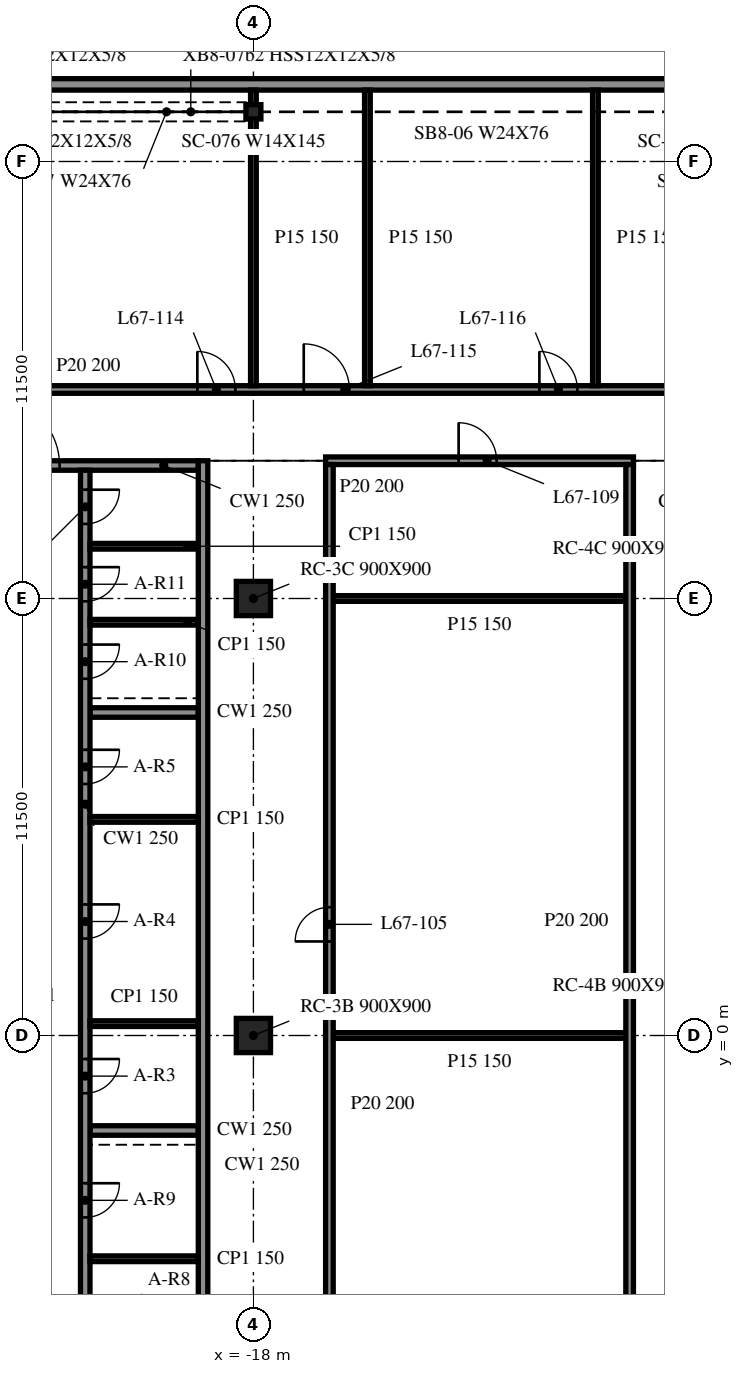
"""IFC4 building model, lengths in metres.
Left out: names, types, materials, properties, quantities, classifications, styles, units other than length and angle.
Written with IfcOpenShell. Run it as: python <this file> out.ifc"""

import sys

from ifc_helpers import new_model, si_unit, direction, frame, frame_2d, origin, origin_2d, place, context, subcontext, project, spatial, rectangle, i_section, extrude, element, fill, save


model = new_model("IFC4")
c1 = context("Model", 3, precision=1e-05, world=origin(), true_north=direction((0.0, 1.0)))
c2 = subcontext(c1, "Body", "Model", "MODEL_VIEW")
j1 = project(units=[si_unit("LENGTHUNIT", "METRE"), si_unit("PLANEANGLEUNIT", "RADIAN")], contexts=[c1])
p1 = place(None, origin())
s1 = spatial("IfcSite", under=j1, at=p1, CompositionType="ELEMENT")
p2 = place(p1, origin())
s2 = spatial("IfcBuilding", under=s1, at=p2, CompositionType="ELEMENT")
p3 = place(p2, frame((0.0, 0.0, 274.7)))
s3 = spatial("IfcBuildingStorey", under=s2, at=p3, CompositionType="ELEMENT", Elevation=274.7)
for number, where, z_axis, x_axis in (
    (1, (-18.0, 0.0, -0.34), (0.0, 0.0, 1.0), (1.0, 0.0, 0.0)),
    (2, (-18.0, 11.5, -0.34), (0.0, 0.0, 1.0), (1.0, 0.0, 0.0)),
):
    element("IfcColumn", number, at=place(p3, frame(where, z_axis=z_axis, x_axis=x_axis)), inside=s3, PredefinedType="COLUMN", context=c2, shape_type="SweptSolid", body=[
        extrude(rectangle(XDim=0.9, YDim=0.9, at=origin_2d()), origin(), (0.0, 0.0, 1.0), 3.8),
    ])
p4 = place(p3, frame((-18.0, 24.307, -0.34), z_axis=(0.0, 0.0, 1.0), x_axis=(1.0, 0.0, 0.0)))
e3 = element("IfcColumn", 3, at=p4, inside=s3, PredefinedType="COLUMN", context=c2, shape_type="SweptSolid", body=[
    extrude(i_section(OverallWidth=0.394, OverallDepth=0.376, WebThickness=0.017, FlangeThickness=0.028, at=origin_2d()), origin(), (0.0, 0.0, 1.0), 3.8),
])
p5 = place(p3, frame((42.0, 25.029, 0.0), z_axis=(0.0, 0.0, 1.0), x_axis=(-1.0, 0.0, 0.0)))
e4 = element("IfcWall", 4, at=p5, inside=s3, PredefinedType="NOTDEFINED", context=c2, shape_type="SweptSolid", body=[
    extrude(rectangle(XDim=84.0, YDim=0.3, at=frame_2d((42.0, 0.0))), origin(), (0.0, 0.0, 1.0), 2.853),
])
p6 = place(p3, frame((-19.325, -9.125, 0.0), z_axis=(0.0, 0.0, 1.0), x_axis=(0.0, 1.0, 0.0)))
e5 = element("IfcWall", 5, at=p6, inside=s3, PredefinedType="SOLIDWALL", context=c2, shape_type="SweptSolid", body=[
    extrude(rectangle(XDim=24.25, YDim=0.25, at=frame_2d((12.125, 0.0))), origin(), (0.0, 0.0, 1.0), 3.46),
])
p7 = place(p3, frame((-28.55, 15.0, 0.0), z_axis=(0.0, 0.0, 1.0), x_axis=(1.0, 0.0, 0.0)))
e6 = element("IfcWall", 6, at=p7, inside=s3, PredefinedType="SOLIDWALL", context=c2, shape_type="SweptSolid", body=[
    extrude(rectangle(XDim=9.1, YDim=0.25, at=frame_2d((4.55, 0.0))), origin(), (0.0, 0.0, 1.0), 3.46),
])
p8 = place(p7, frame((3.65, 0.0, 0.0)))
e7 = element("IfcOpeningElement", 7, at=p8, cuts=e6, PredefinedType="OPENING", context=c2, shape_type="SweptSolid", body=[
    extrude(rectangle(XDim=1.8, YDim=2.1, at=frame_2d((0.9, 1.05))), frame((0.0, 0.135, 0.0), z_axis=(0.0, -1.0, 0.0), x_axis=(1.0, 0.0, 0.0)), (0.0, 0.0, 1.0), 0.27),
])
p9 = place(p3, frame((-22.425, 14.875, 0.0), z_axis=(0.0, 0.0, 1.0), x_axis=(0.0, -1.0, 0.0)))
e8 = element("IfcWall", 8, at=p9, inside=s3, PredefinedType="SOLIDWALL", context=c2, shape_type="SweptSolid", body=[
    extrude(rectangle(XDim=23.75, YDim=0.25, at=frame_2d((11.875, 0.0))), origin(), (0.0, 0.0, 1.0), 3.46),
])
p10 = place(p9, frame((15.494, 0.0, 0.0)))
e9 = element("IfcOpeningElement", 9, at=p10, cuts=e8, PredefinedType="OPENING", context=c2, shape_type="SweptSolid", body=[
    extrude(rectangle(XDim=0.9, YDim=2.1, at=frame_2d((0.45, 1.05))), frame((0.0, 0.135, 0.0), z_axis=(0.0, -1.0, 0.0), x_axis=(1.0, 0.0, 0.0)), (0.0, 0.0, 1.0), 0.27),
])
p11 = place(p9, frame((11.425, 0.0, 0.0)))
e10 = element("IfcOpeningElement", 10, at=p11, cuts=e8, PredefinedType="OPENING", context=c2, shape_type="SweptSolid", body=[
    extrude(rectangle(XDim=0.9, YDim=2.1, at=frame_2d((0.45, 1.05))), frame((0.0, 0.135, 0.0), z_axis=(0.0, -1.0, 0.0), x_axis=(1.0, 0.0, 0.0)), (0.0, 0.0, 1.0), 0.27),
])
p12 = place(p9, frame((7.356, 0.0, 0.0)))
e11 = element("IfcOpeningElement", 11, at=p12, cuts=e8, PredefinedType="OPENING", context=c2, shape_type="SweptSolid", body=[
    extrude(rectangle(XDim=0.9, YDim=2.1, at=frame_2d((0.45, 1.05))), frame((0.0, 0.135, 0.0), z_axis=(0.0, -1.0, 0.0), x_axis=(1.0, 0.0, 0.0)), (0.0, 0.0, 1.0), 0.27),
])
p13 = place(p9, frame((21.837, 0.0, 0.0)))
e12 = element("IfcOpeningElement", 12, at=p13, cuts=e8, PredefinedType="OPENING", context=c2, shape_type="SweptSolid", body=[
    extrude(rectangle(XDim=0.9, YDim=2.1, at=frame_2d((0.45, 1.05))), frame((0.0, 0.135, 0.0), z_axis=(0.0, -1.0, 0.0), x_axis=(1.0, 0.0, 0.0)), (0.0, 0.0, 1.0), 0.27),
])
p14 = place(p9, frame((18.762, 0.0, 0.0)))
e13 = element("IfcOpeningElement", 13, at=p14, cuts=e8, PredefinedType="OPENING", context=c2, shape_type="SweptSolid", body=[
    extrude(rectangle(XDim=0.9, YDim=2.1, at=frame_2d((0.45, 1.05))), frame((0.0, 0.135, 0.0), z_axis=(0.0, -1.0, 0.0), x_axis=(1.0, 0.0, 0.0)), (0.0, 0.0, 1.0), 0.27),
])
p15 = place(p9, frame((4.587, 0.0, 0.0)))
e14 = element("IfcOpeningElement", 14, at=p15, cuts=e8, PredefinedType="OPENING", context=c2, shape_type="SweptSolid", body=[
    extrude(rectangle(XDim=0.9, YDim=2.1, at=frame_2d((0.45, 1.05))), frame((0.0, 0.135, 0.0), z_axis=(0.0, -1.0, 0.0), x_axis=(1.0, 0.0, 0.0)), (0.0, 0.0, 1.0), 0.27),
])
p16 = place(p9, frame((2.55, 0.0, 0.0)))
e15 = element("IfcOpeningElement", 15, at=p16, cuts=e8, PredefinedType="OPENING", context=c2, shape_type="SweptSolid", body=[
    extrude(rectangle(XDim=0.9, YDim=2.1, at=frame_2d((0.45, 1.05))), frame((0.0, 0.135, 0.0), z_axis=(0.0, -1.0, 0.0), x_axis=(1.0, 0.0, 0.0)), (0.0, 0.0, 1.0), 0.27),
])
p17 = place(p9, frame((0.512, 0.0, 0.0)))
e16 = element("IfcOpeningElement", 16, at=p17, cuts=e8, PredefinedType="OPENING", context=c2, shape_type="SweptSolid", body=[
    extrude(rectangle(XDim=0.9, YDim=2.1, at=frame_2d((0.45, 1.05))), frame((0.0, 0.135, 0.0), z_axis=(0.0, -1.0, 0.0), x_axis=(1.0, 0.0, 0.0)), (0.0, 0.0, 1.0), 0.27),
])
for number, where, z_axis, x_axis in (
    (17, (-22.3, -2.5, 0.0), (0.0, 0.0, 1.0), (1.0, 0.0, 0.0)),
    (18, (-22.3, 8.5, 0.0), (0.0, 0.0, 1.0), (1.0, 0.0, 0.0)),
):
    element("IfcWall", number, at=place(p3, frame(where, z_axis=z_axis, x_axis=x_axis)), inside=s3, PredefinedType="SOLIDWALL", context=c2, shape_type="SweptSolid", body=[
        extrude(rectangle(XDim=2.85, YDim=0.25, at=frame_2d((1.425, 0.0))), origin(), (0.0, 0.0, 1.0), 3.46),
    ])
for number, where, z_axis, x_axis in (
    (19, (-22.3, 0.312, 0.0), (0.0, 0.0, 1.0), (1.0, 0.0, 0.0)),
    (20, (-22.3, 5.688, 0.0), (0.0, 0.0, 1.0), (1.0, 0.0, 0.0)),
    (21, (-22.3, -5.875, 0.0), (0.0, 0.0, 1.0), (1.0, 0.0, 0.0)),
    (22, (-22.3, 10.875, 0.0), (0.0, 0.0, 1.0), (1.0, 0.0, 0.0)),
    (23, (-22.3, 12.875, 0.0), (0.0, 0.0, 1.0), (1.0, 0.0, 0.0)),
):
    element("IfcWall", number, at=place(p3, frame(where, z_axis=z_axis, x_axis=x_axis)), inside=s3, PredefinedType="PARTITIONING", context=c2, shape_type="SweptSolid", body=[
        extrude(rectangle(XDim=2.85, YDim=0.15, at=frame_2d((1.425, 0.0))), origin(), (0.0, 0.0, 1.0), 3.46),
    ])
for number, where, z_axis, x_axis in (
    (24, (-15.9, 0.0, 0.0), (0.0, 0.0, 1.0), (1.0, 0.0, 0.0)),
    (25, (-15.9, 11.5, 0.0), (0.0, 0.0, 1.0), (1.0, 0.0, 0.0)),
):
    element("IfcWall", number, at=place(p3, frame(where, z_axis=z_axis, x_axis=x_axis)), inside=s3, PredefinedType="PARTITIONING", context=c2, shape_type="SweptSolid", body=[
        extrude(rectangle(XDim=7.7, YDim=0.15, at=frame_2d((3.85, 0.0))), origin(), (0.0, 0.0, 1.0), 3.46),
    ])
p18 = place(p3, frame((-16.1, 15.125, 0.0), z_axis=(0.0, 0.0, 1.0), x_axis=(1.0, 0.0, 0.0)))
e26 = element("IfcWall", 26, at=p18, inside=s3, PredefinedType="PARTITIONING", context=c2, shape_type="SweptSolid", body=[
    extrude(rectangle(XDim=8.1, YDim=0.2, at=frame_2d((4.05, 0.0))), origin(), (0.0, 0.0, 1.0), 3.46),
])
p19 = place(p18, frame((3.5, 0.0, 0.0)))
e27 = element("IfcOpeningElement", 27, at=p19, cuts=e26, PredefinedType="OPENING", context=c2, shape_type="SweptSolid", body=[
    extrude(rectangle(XDim=1.0, YDim=2.1, at=frame_2d((0.5, 1.05))), frame((0.0, 0.11, 0.0), z_axis=(0.0, -1.0, 0.0), x_axis=(1.0, 0.0, 0.0)), (0.0, 0.0, 1.0), 0.22),
])
p20 = place(p3, frame((-47.975, 17.0, 0.0), z_axis=(0.0, 0.0, 1.0), x_axis=(1.0, 0.0, 0.0)))
e28 = element("IfcWall", 28, at=p20, inside=s3, PredefinedType="PARTITIONING", context=c2, shape_type="SweptSolid", body=[
    extrude(rectangle(XDim=95.95, YDim=0.2, at=frame_2d((47.975, 0.0))), origin(), (0.0, 0.0, 1.0), 3.46),
])
p21 = place(p20, frame((7.3, 0.0, 0.0)))
e29 = element("IfcOpeningElement", 29, at=p21, cuts=e28, PredefinedType="OPENING", context=c2, shape_type="SweptSolid", body=[
    extrude(rectangle(XDim=1.2, YDim=2.1, at=frame_2d((0.6, 1.05))), frame((0.0, 0.11, 0.0), z_axis=(0.0, -1.0, 0.0), x_axis=(1.0, 0.0, 0.0)), (0.0, 0.0, 1.0), 0.22),
])
p22 = place(p20, frame((13.3, 0.0, 0.0)))
e30 = element("IfcOpeningElement", 30, at=p22, cuts=e28, PredefinedType="OPENING", context=c2, shape_type="SweptSolid", body=[
    extrude(rectangle(XDim=1.2, YDim=2.1, at=frame_2d((0.6, 1.05))), frame((0.0, 0.11, 0.0), z_axis=(0.0, -1.0, 0.0), x_axis=(1.0, 0.0, 0.0)), (0.0, 0.0, 1.0), 0.22),
])
p23 = place(p20, frame((19.3, 0.0, 0.0)))
e31 = element("IfcOpeningElement", 31, at=p23, cuts=e28, PredefinedType="OPENING", context=c2, shape_type="SweptSolid", body=[
    extrude(rectangle(XDim=1.2, YDim=2.1, at=frame_2d((0.6, 1.05))), frame((0.0, 0.11, 0.0), z_axis=(0.0, -1.0, 0.0), x_axis=(1.0, 0.0, 0.0)), (0.0, 0.0, 1.0), 0.22),
])
p24 = place(p20, frame((28.5, 0.0, 0.0)))
e32 = element("IfcOpeningElement", 32, at=p24, cuts=e28, PredefinedType="OPENING", context=c2, shape_type="SweptSolid", body=[
    extrude(rectangle(XDim=1.0, YDim=2.1, at=frame_2d((0.5, 1.05))), frame((0.0, 0.11, 0.0), z_axis=(0.0, -1.0, 0.0), x_axis=(1.0, 0.0, 0.0)), (0.0, 0.0, 1.0), 0.22),
])
p25 = place(p20, frame((31.3, 0.0, 0.0)))
e33 = element("IfcOpeningElement", 33, at=p25, cuts=e28, PredefinedType="OPENING", context=c2, shape_type="SweptSolid", body=[
    extrude(rectangle(XDim=1.2, YDim=2.1, at=frame_2d((0.6, 1.05))), frame((0.0, 0.11, 0.0), z_axis=(0.0, -1.0, 0.0), x_axis=(1.0, 0.0, 0.0)), (0.0, 0.0, 1.0), 0.22),
])
p26 = place(p20, frame((37.5, 0.0, 0.0)))
e34 = element("IfcOpeningElement", 34, at=p26, cuts=e28, PredefinedType="OPENING", context=c2, shape_type="SweptSolid", body=[
    extrude(rectangle(XDim=1.0, YDim=2.1, at=frame_2d((0.5, 1.05))), frame((0.0, 0.11, 0.0), z_axis=(0.0, -1.0, 0.0), x_axis=(1.0, 0.0, 0.0)), (0.0, 0.0, 1.0), 0.22),
])
p27 = place(p20, frame((43.3, 0.0, 0.0)))
e35 = element("IfcOpeningElement", 35, at=p27, cuts=e28, PredefinedType="OPENING", context=c2, shape_type="SweptSolid", body=[
    extrude(rectangle(XDim=1.2, YDim=2.1, at=frame_2d((0.6, 1.05))), frame((0.0, 0.11, 0.0), z_axis=(0.0, -1.0, 0.0), x_axis=(1.0, 0.0, 0.0)), (0.0, 0.0, 1.0), 0.22),
])
p28 = place(p20, frame((47.3, 0.0, 0.0)))
e36 = element("IfcOpeningElement", 36, at=p28, cuts=e28, PredefinedType="OPENING", context=c2, shape_type="SweptSolid", body=[
    extrude(rectangle(XDim=1.2, YDim=2.1, at=frame_2d((0.6, 1.05))), frame((0.0, 0.11, 0.0), z_axis=(0.0, -1.0, 0.0), x_axis=(1.0, 0.0, 0.0)), (0.0, 0.0, 1.0), 0.22),
])
p29 = place(p20, frame((51.1, 0.0, 0.0)))
e37 = element("IfcOpeningElement", 37, at=p29, cuts=e28, PredefinedType="OPENING", context=c2, shape_type="SweptSolid", body=[
    extrude(rectangle(XDim=1.2, YDim=2.1, at=frame_2d((0.6, 1.05))), frame((0.0, 0.11, 0.0), z_axis=(0.0, -1.0, 0.0), x_axis=(1.0, 0.0, 0.0)), (0.0, 0.0, 1.0), 0.22),
])
p30 = place(p20, frame((60.1, 0.0, 0.0)))
e38 = element("IfcOpeningElement", 38, at=p30, cuts=e28, PredefinedType="OPENING", context=c2, shape_type="SweptSolid", body=[
    extrude(rectangle(XDim=1.0, YDim=2.1, at=frame_2d((0.5, 1.05))), frame((0.0, 0.11, 0.0), z_axis=(0.0, -1.0, 0.0), x_axis=(1.0, 0.0, 0.0)), (0.0, 0.0, 1.0), 0.22),
])
p31 = place(p20, frame((63.1, 0.0, 0.0)))
e39 = element("IfcOpeningElement", 39, at=p31, cuts=e28, PredefinedType="OPENING", context=c2, shape_type="SweptSolid", body=[
    extrude(rectangle(XDim=1.2, YDim=2.1, at=frame_2d((0.6, 1.05))), frame((0.0, 0.11, 0.0), z_axis=(0.0, -1.0, 0.0), x_axis=(1.0, 0.0, 0.0)), (0.0, 0.0, 1.0), 0.22),
])
p32 = place(p20, frame((69.1, 0.0, 0.0)))
e40 = element("IfcOpeningElement", 40, at=p32, cuts=e28, PredefinedType="OPENING", context=c2, shape_type="SweptSolid", body=[
    extrude(rectangle(XDim=1.0, YDim=2.1, at=frame_2d((0.5, 1.05))), frame((0.0, 0.11, 0.0), z_axis=(0.0, -1.0, 0.0), x_axis=(1.0, 0.0, 0.0)), (0.0, 0.0, 1.0), 0.22),
])
p33 = place(p20, frame((75.1, 0.0, 0.0)))
e41 = element("IfcOpeningElement", 41, at=p33, cuts=e28, PredefinedType="OPENING", context=c2, shape_type="SweptSolid", body=[
    extrude(rectangle(XDim=1.2, YDim=2.1, at=frame_2d((0.6, 1.05))), frame((0.0, 0.11, 0.0), z_axis=(0.0, -1.0, 0.0), x_axis=(1.0, 0.0, 0.0)), (0.0, 0.0, 1.0), 0.22),
])
p34 = place(p20, frame((81.1, 0.0, 0.0)))
e42 = element("IfcOpeningElement", 42, at=p34, cuts=e28, PredefinedType="OPENING", context=c2, shape_type="SweptSolid", body=[
    extrude(rectangle(XDim=1.2, YDim=2.1, at=frame_2d((0.6, 1.05))), frame((0.0, 0.11, 0.0), z_axis=(0.0, -1.0, 0.0), x_axis=(1.0, 0.0, 0.0)), (0.0, 0.0, 1.0), 0.22),
])
p35 = place(p20, frame((90.1, 0.0, 0.0)))
e43 = element("IfcOpeningElement", 43, at=p35, cuts=e28, PredefinedType="OPENING", context=c2, shape_type="SweptSolid", body=[
    extrude(rectangle(XDim=1.2, YDim=2.1, at=frame_2d((0.6, 1.05))), frame((0.0, 0.11, 0.0), z_axis=(0.0, -1.0, 0.0), x_axis=(1.0, 0.0, 0.0)), (0.0, 0.0, 1.0), 0.22),
])
p36 = place(p3, frame((-18.0, 17.1, 0.0), z_axis=(0.0, 0.0, 1.0), x_axis=(0.0, 1.0, 0.0)))
e44 = element("IfcWall", 44, at=p36, inside=s3, PredefinedType="PARTITIONING", context=c2, shape_type="SweptSolid", body=[
    extrude(rectangle(XDim=7.779, YDim=0.15, at=frame_2d((3.889, 0.0))), origin(), (0.0, 0.0, 1.0), 3.46),
])
p37 = place(p3, frame((-16.0, -9.025, 0.0), z_axis=(0.0, 0.0, 1.0), x_axis=(0.0, 1.0, 0.0)))
e45 = element("IfcWall", 45, at=p37, inside=s3, PredefinedType="PARTITIONING", context=c2, shape_type="SweptSolid", body=[
    extrude(rectangle(XDim=24.05, YDim=0.2, at=frame_2d((12.025, 0.0))), origin(), (0.0, 0.0, 1.0), 3.46),
])
p38 = place(p37, frame((11.5, 0.0, 0.0)))
e46 = element("IfcOpeningElement", 46, at=p38, cuts=e45, PredefinedType="OPENING", context=c2, shape_type="SweptSolid", body=[
    extrude(rectangle(XDim=0.9, YDim=2.1, at=frame_2d((0.45, 1.05))), frame((0.0, 0.11, 0.0), z_axis=(0.0, -1.0, 0.0), x_axis=(1.0, 0.0, 0.0)), (0.0, 0.0, 1.0), 0.22),
])
for number, where, z_axis, x_axis in (
    (47, (-15.0, 17.1, 0.0), (0.0, 0.0, 1.0), (0.0, 1.0, 0.0)),
    (48, (-9.0, 17.1, 0.0), (0.0, 0.0, 1.0), (0.0, 1.0, 0.0)),
):
    element("IfcWall", number, at=place(p3, frame(where, z_axis=z_axis, x_axis=x_axis)), inside=s3, PredefinedType="PARTITIONING", context=c2, shape_type="SweptSolid", body=[
        extrude(rectangle(XDim=7.779, YDim=0.15, at=frame_2d((3.889, 0.0))), origin(), (0.0, 0.0, 1.0), 3.46),
    ])
p39 = place(p3, frame((-8.1, -9.025, 0.0), z_axis=(0.0, 0.0, 1.0), x_axis=(0.0, 1.0, 0.0)))
e49 = element("IfcWall", 49, at=p39, inside=s3, PredefinedType="PARTITIONING", context=c2, shape_type="SweptSolid", body=[
    extrude(rectangle(XDim=24.05, YDim=0.2, at=frame_2d((12.025, 0.0))), origin(), (0.0, 0.0, 1.0), 3.46),
])
p40 = place(p8, origin())
e50 = element("IfcDoor", 50, at=p40, inside=s3, OperationType="DOUBLE_DOOR_SINGLE_SWING", PredefinedType="DOOR", context=c2, shape_type="SweptSolid", body=[
    extrude(rectangle(XDim=1.8, YDim=2.1, at=frame_2d((0.9, 1.05))), frame((0.0, 0.025, 0.0), z_axis=(0.0, -1.0, 0.0), x_axis=(1.0, 0.0, 0.0)), (0.0, 0.0, 1.0), 0.05),
])
fill(e7, e50)
p41 = place(p10, origin())
e51 = element("IfcDoor", 51, at=p41, inside=s3, OperationType="SINGLE_SWING_LEFT", PredefinedType="DOOR", context=c2, shape_type="SweptSolid", body=[
    extrude(rectangle(XDim=0.9, YDim=2.1, at=frame_2d((0.45, 1.05))), frame((0.0, 0.025, 0.0), z_axis=(0.0, -1.0, 0.0), x_axis=(1.0, 0.0, 0.0)), (0.0, 0.0, 1.0), 0.05),
])
fill(e9, e51)
p42 = place(p11, origin())
e52 = element("IfcDoor", 52, at=p42, inside=s3, OperationType="SINGLE_SWING_RIGHT", PredefinedType="DOOR", context=c2, shape_type="SweptSolid", body=[
    extrude(rectangle(XDim=0.9, YDim=2.1, at=frame_2d((0.45, 1.05))), frame((0.0, 0.025, 0.0), z_axis=(0.0, -1.0, 0.0), x_axis=(1.0, 0.0, 0.0)), (0.0, 0.0, 1.0), 0.05),
])
fill(e10, e52)
p43 = place(p12, origin())
e53 = element("IfcDoor", 53, at=p43, inside=s3, OperationType="SINGLE_SWING_LEFT", PredefinedType="DOOR", context=c2, shape_type="SweptSolid", body=[
    extrude(rectangle(XDim=0.9, YDim=2.1, at=frame_2d((0.45, 1.05))), frame((0.0, 0.025, 0.0), z_axis=(0.0, -1.0, 0.0), x_axis=(1.0, 0.0, 0.0)), (0.0, 0.0, 1.0), 0.05),
])
fill(e11, e53)
p44 = place(p14, origin())
e54 = element("IfcDoor", 54, at=p44, inside=s3, OperationType="SINGLE_SWING_LEFT", PredefinedType="DOOR", context=c2, shape_type="SweptSolid", body=[
    extrude(rectangle(XDim=0.9, YDim=2.1, at=frame_2d((0.45, 1.05))), frame((0.0, 0.025, 0.0), z_axis=(0.0, -1.0, 0.0), x_axis=(1.0, 0.0, 0.0)), (0.0, 0.0, 1.0), 0.05),
])
fill(e13, e54)
p45 = place(p15, origin())
e55 = element("IfcDoor", 55, at=p45, inside=s3, OperationType="SINGLE_SWING_RIGHT", PredefinedType="DOOR", context=c2, shape_type="SweptSolid", body=[
    extrude(rectangle(XDim=0.9, YDim=2.1, at=frame_2d((0.45, 1.05))), frame((0.0, 0.025, 0.0), z_axis=(0.0, -1.0, 0.0), x_axis=(1.0, 0.0, 0.0)), (0.0, 0.0, 1.0), 0.05),
])
fill(e14, e55)
p46 = place(p16, origin())
e56 = element("IfcDoor", 56, at=p46, inside=s3, OperationType="SINGLE_SWING_LEFT", PredefinedType="DOOR", context=c2, shape_type="SweptSolid", body=[
    extrude(rectangle(XDim=0.9, YDim=2.1, at=frame_2d((0.45, 1.05))), frame((0.0, 0.025, 0.0), z_axis=(0.0, -1.0, 0.0), x_axis=(1.0, 0.0, 0.0)), (0.0, 0.0, 1.0), 0.05),
])
fill(e15, e56)
p47 = place(p17, origin())
e57 = element("IfcDoor", 57, at=p47, inside=s3, OperationType="SINGLE_SWING_RIGHT", PredefinedType="DOOR", context=c2, shape_type="SweptSolid", body=[
    extrude(rectangle(XDim=0.9, YDim=2.1, at=frame_2d((0.45, 1.05))), frame((0.0, 0.025, 0.0), z_axis=(0.0, -1.0, 0.0), x_axis=(1.0, 0.0, 0.0)), (0.0, 0.0, 1.0), 0.05),
])
fill(e16, e57)
p48 = place(p38, origin())
e58 = element("IfcDoor", 58, at=p48, inside=s3, OperationType="SINGLE_SWING_RIGHT", PredefinedType="DOOR", context=c2, shape_type="SweptSolid", body=[
    extrude(rectangle(XDim=0.9, YDim=2.1, at=frame_2d((0.45, 1.05))), frame((0.0, 0.025, 0.0), z_axis=(0.0, -1.0, 0.0), x_axis=(1.0, 0.0, 0.0)), (0.0, 0.0, 1.0), 0.05),
])
fill(e46, e58)
p49 = place(p19, origin())
e59 = element("IfcDoor", 59, at=p49, inside=s3, OperationType="SINGLE_SWING_RIGHT", PredefinedType="DOOR", context=c2, shape_type="SweptSolid", body=[
    extrude(rectangle(XDim=1.0, YDim=2.1, at=frame_2d((0.5, 1.05))), frame((0.0, 0.025, 0.0), z_axis=(0.0, -1.0, 0.0), x_axis=(1.0, 0.0, 0.0)), (0.0, 0.0, 1.0), 0.05),
])
fill(e27, e59)
p50 = place(p24, origin())
e60 = element("IfcDoor", 60, at=p50, inside=s3, OperationType="SINGLE_SWING_LEFT", PredefinedType="DOOR", context=c2, shape_type="SweptSolid", body=[
    extrude(rectangle(XDim=1.0, YDim=2.1, at=frame_2d((0.5, 1.05))), frame((0.0, 0.025, 0.0), z_axis=(0.0, -1.0, 0.0), x_axis=(1.0, 0.0, 0.0)), (0.0, 0.0, 1.0), 0.05),
])
fill(e32, e60)
p51 = place(p25, origin())
e61 = element("IfcDoor", 61, at=p51, inside=s3, OperationType="SINGLE_SWING_LEFT", PredefinedType="DOOR", context=c2, shape_type="SweptSolid", body=[
    extrude(rectangle(XDim=1.2, YDim=2.1, at=frame_2d((0.6, 1.05))), frame((0.0, 0.025, 0.0), z_axis=(0.0, -1.0, 0.0), x_axis=(1.0, 0.0, 0.0)), (0.0, 0.0, 1.0), 0.05),
])
fill(e33, e61)
p52 = place(p26, origin())
e62 = element("IfcDoor", 62, at=p52, inside=s3, OperationType="SINGLE_SWING_LEFT", PredefinedType="DOOR", context=c2, shape_type="SweptSolid", body=[
    extrude(rectangle(XDim=1.0, YDim=2.1, at=frame_2d((0.5, 1.05))), frame((0.0, 0.025, 0.0), z_axis=(0.0, -1.0, 0.0), x_axis=(1.0, 0.0, 0.0)), (0.0, 0.0, 1.0), 0.05),
])
fill(e34, e62)
save(model, sys.argv[1])
